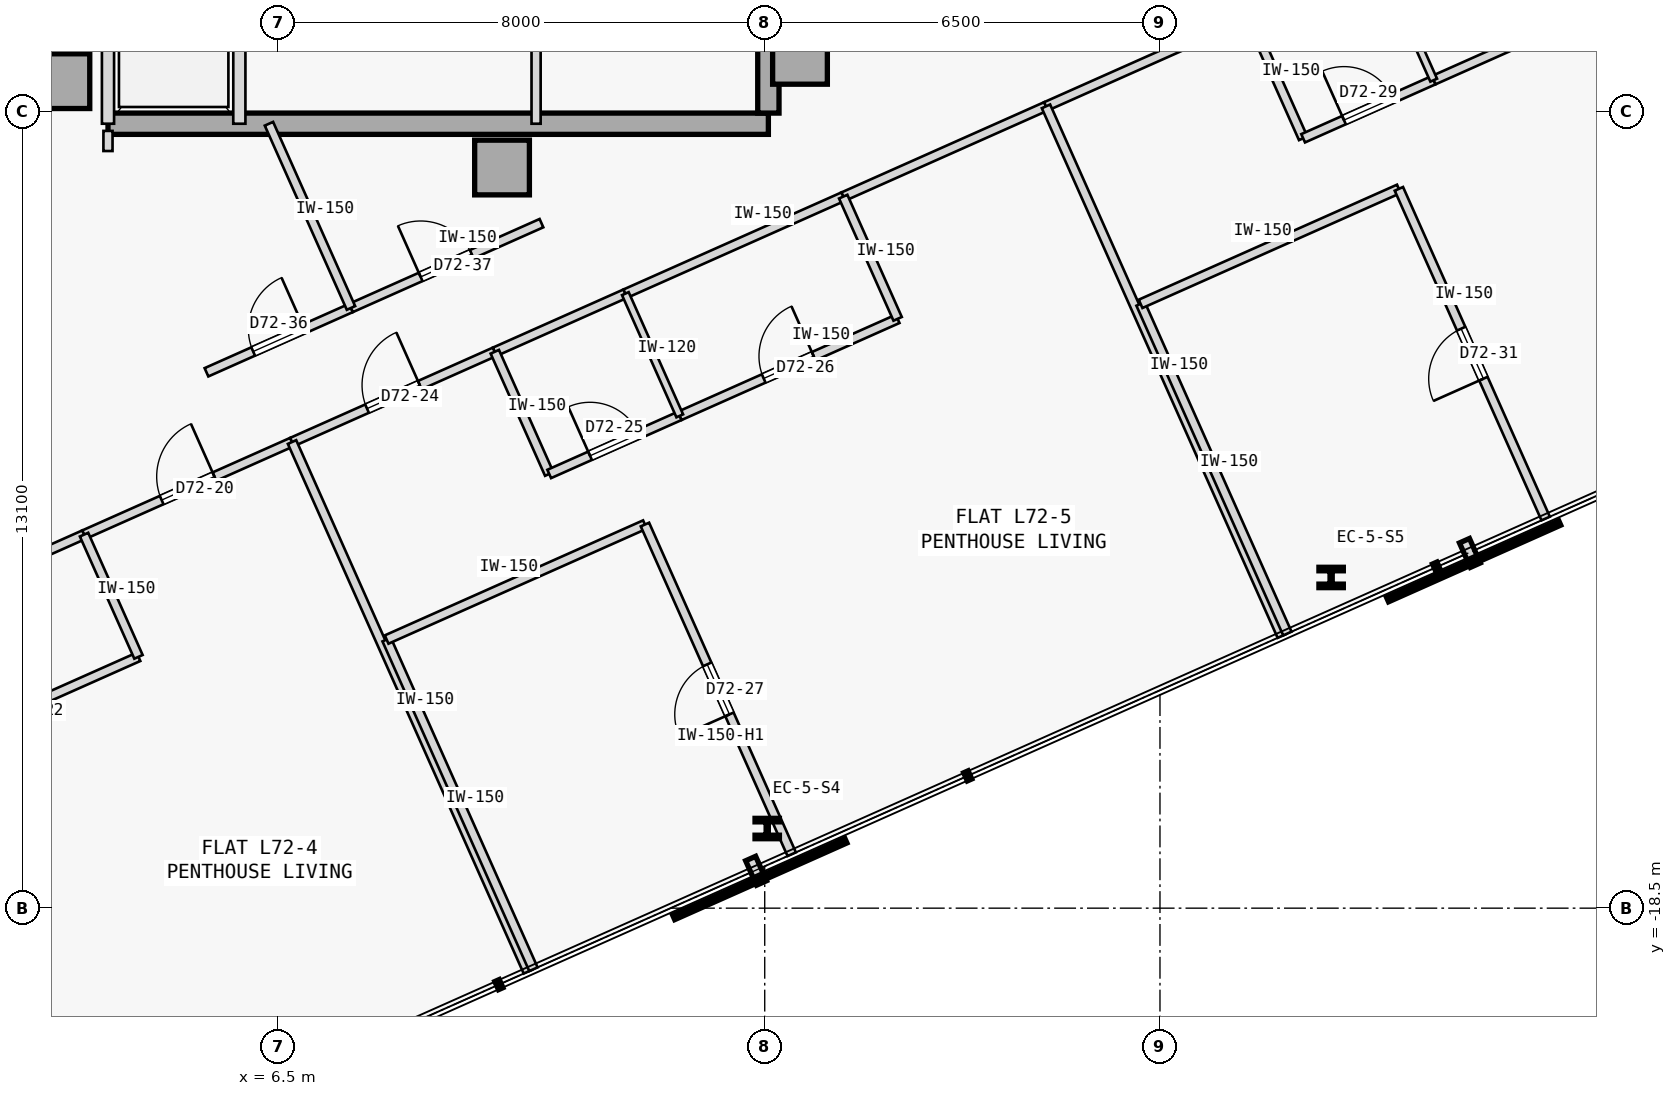
"""IFC4 building model, lengths in metres.
Left out: names, types, materials, properties, quantities, classifications, styles, units other than length and angle.
Written with IfcOpenShell. Run it as: python <this file> out.ifc"""

import sys

from ifc_helpers import new_model, si_unit, direction, frame, frame_2d, origin, origin_2d, place, context, subcontext, project, spatial, rectangle, i_section, extrude, element, fill, save


model = new_model("IFC4")
c1 = context("Model", 3, precision=1e-05, world=origin(), true_north=direction((0.0, 1.0)))
c2 = subcontext(c1, "Body", "Model", "MODEL_VIEW")
j1 = project(units=[si_unit("LENGTHUNIT", "METRE"), si_unit("PLANEANGLEUNIT", "RADIAN")], contexts=[c1])
p1 = place(None, origin())
s1 = spatial("IfcSite", under=j1, at=p1, CompositionType="ELEMENT")
p2 = place(p1, origin())
s2 = spatial("IfcBuilding", under=s1, at=p2, CompositionType="ELEMENT")
p3 = place(p2, frame((0.0, 0.0, 268.9)))
s3 = spatial("IfcBuildingStorey", under=s2, at=p3, CompositionType="ELEMENT", Elevation=268.9)
for number, where, z_axis, x_axis in (
    (1, (15.08, -4.5, 0.0), (0.0, 0.0, 1.0), (1.0, 0.0, 0.0)),
    (2, (10.18, -6.32, 0.0), (0.0, 0.0, 1.0), (1.0, 0.0, 0.0)),
    (3, (2.95, -4.9, 0.0), (0.0, 0.0, 1.0), (1.0, 0.0, 0.0)),
):
    element("IfcColumn", number, at=place(p3, frame(where, z_axis=z_axis, x_axis=x_axis)), inside=s3, PredefinedType="COLUMN", context=c2, shape_type="SweptSolid", body=[
        extrude(rectangle(XDim=0.9, YDim=0.9, at=origin_2d()), origin(), (0.0, 0.0, 1.0), 3.35),
    ])
p4 = place(p3, frame((3.7, -5.6, 0.0), z_axis=(0.0, 0.0, 1.0), x_axis=(1.0, 0.0, 0.0)))
e4 = element("IfcWall", 4, at=p4, inside=s3, PredefinedType="SHEAR", context=c2, shape_type="SweptSolid", body=[
    extrude(rectangle(XDim=10.86, YDim=0.35, at=frame_2d((5.43, 0.0))), origin(), (0.0, 0.0, 1.0), 3.125),
])
p5 = place(p3, frame((14.56, -5.425, 0.0), z_axis=(0.0, 0.0, 1.0), x_axis=(0.0, 1.0, 0.0)))
e5 = element("IfcWall", 5, at=p5, inside=s3, PredefinedType="SHEAR", context=c2, shape_type="SweptSolid", body=[
    extrude(rectangle(XDim=10.85, YDim=0.35, at=frame_2d((5.425, 0.0))), origin(), (0.0, 0.0, 1.0), 3.125),
])
for number, where, z_axis, x_axis in (
    (6, (14.541, -17.19, 0.0), (0.0, 0.0, 1.0), (1.0, 0.0, 0.0)),
    (7, (23.814, -13.062, 0.0), (0.0, 0.0, 1.0), (1.0, 0.0, 0.0)),
):
    element("IfcColumn", number, at=place(p3, frame(where, z_axis=z_axis, x_axis=x_axis)), inside=s3, PredefinedType="COLUMN", context=c2, shape_type="SweptSolid", body=[
        extrude(i_section(OverallWidth=0.401, OverallDepth=0.335, WebThickness=0.036, FlangeThickness=0.058, FilletRadius=0.015, at=origin_2d()), origin(), (0.0, 0.0, 1.0), 3.35),
    ])
for number, where, z_axis, x_axis in (
    (8, (3.7, -5.6, 0.0), (0.0, 0.0, 1.0), (0.0, 1.0, 0.0)),
    (9, (5.86, -5.6, 0.0), (0.0, 0.0, 1.0), (0.0, 1.0, 0.0)),
):
    element("IfcWall", number, at=place(p3, frame(where, z_axis=z_axis, x_axis=x_axis)), inside=s3, PredefinedType="STANDARD", context=c2, shape_type="SweptSolid", body=[
        extrude(rectangle(XDim=2.65, YDim=0.2, at=frame_2d((1.325, 0.0))), origin(), (0.0, 0.0, 1.0), 3.125),
    ])
p6 = place(p3, frame((10.74, -5.6, 0.0), z_axis=(0.0, 0.0, 1.0), x_axis=(0.0, 1.0, 0.0)))
e10 = element("IfcWall", 10, at=p6, inside=s3, PredefinedType="PARTITIONING", context=c2, shape_type="SweptSolid", body=[
    extrude(rectangle(XDim=2.65, YDim=0.15, at=frame_2d((1.325, 0.0))), origin(), (0.0, 0.0, 1.0), 3.125),
])
p7 = place(p3, frame((3.306, -12.357, 0.0), z_axis=(0.0, 0.0, 1.0), x_axis=(0.913550513402, 0.406725287464, 0.0)))
e11 = element("IfcWall", 11, at=p7, inside=s3, PredefinedType="PARTITIONING", context=c2, shape_type="SweptSolid", body=[
    extrude(rectangle(XDim=3.744, YDim=0.15, at=frame_2d((1.872, 0.0))), origin(), (0.0, 0.0, 1.0), 3.125),
])
p8 = place(p7, frame((1.397, 0.0, 0.0)))
e12 = element("IfcOpeningElement", 12, at=p8, cuts=e11, PredefinedType="OPENING", context=c2, shape_type="SweptSolid", body=[
    extrude(rectangle(XDim=0.95, YDim=2.15, at=frame_2d((0.475, 1.075))), frame((0.0, 0.085, 0.0), z_axis=(0.0, -1.0, 0.0), x_axis=(1.0, 0.0, 0.0)), (0.0, 0.0, 1.0), 0.17),
])
p9 = place(p3, frame((-0.667, -14.126, 0.0), z_axis=(0.0, 0.0, 1.0), x_axis=(0.913545193015, 0.406737237438, 0.0)))
e13 = element("IfcWall", 13, at=p9, inside=s3, PredefinedType="PARTITIONING", context=c2, shape_type="SweptSolid", body=[
    extrude(rectangle(XDim=4.35, YDim=0.15, at=frame_2d((2.175, 0.0))), origin(), (0.0, 0.0, 1.0), 3.125),
])
p10 = place(p3, frame((6.727, -10.834, 0.0), z_axis=(0.0, 0.0, 1.0), x_axis=(0.913543802, 0.40674036169, 0.0)))
e14 = element("IfcWall", 14, at=p10, inside=s3, PredefinedType="PARTITIONING", context=c2, shape_type="SweptSolid", body=[
    extrude(rectangle(XDim=3.65, YDim=0.15, at=frame_2d((1.825, 0.0))), origin(), (0.0, 0.0, 1.0), 3.125),
])
p11 = place(p10, frame((1.35, 0.0, 0.0)))
e15 = element("IfcOpeningElement", 15, at=p11, cuts=e14, PredefinedType="OPENING", context=c2, shape_type="SweptSolid", body=[
    extrude(rectangle(XDim=0.95, YDim=2.15, at=frame_2d((0.475, 1.075))), frame((0.0, 0.085, 0.0), z_axis=(0.0, -1.0, 0.0), x_axis=(1.0, 0.0, 0.0)), (0.0, 0.0, 1.0), 0.17),
])
p12 = place(p3, frame((15.791, -6.799, 0.0), z_axis=(0.0, 0.0, 1.0), x_axis=(0.913543802, 0.40674036169, 0.0)))
e16 = element("IfcWall", 16, at=p12, inside=s3, PredefinedType="PARTITIONING", context=c2, shape_type="SweptSolid", body=[
    extrude(rectangle(XDim=3.65, YDim=0.15, at=frame_2d((1.825, 0.0))), origin(), (0.0, 0.0, 1.0), 3.125),
])
p13 = place(p3, frame((10.061, -9.35, 0.0), z_axis=(0.0, 0.0, 1.0), x_axis=(0.913558622212, 0.406707073682, 0.0)))
e17 = element("IfcWall", 17, at=p13, inside=s3, PredefinedType="PARTITIONING", context=c2, shape_type="SweptSolid", body=[
    extrude(rectangle(XDim=2.35, YDim=0.15, at=frame_2d((1.175, 0.0))), origin(), (0.0, 0.0, 1.0), 3.125),
])
p14 = place(p3, frame((12.208, -8.394, 0.0), z_axis=(0.0, 0.0, 1.0), x_axis=(0.913539234326, 0.406750620585, 0.0)))
e18 = element("IfcWall", 18, at=p14, inside=s3, PredefinedType="PARTITIONING", context=c2, shape_type="SweptSolid", body=[
    extrude(rectangle(XDim=3.922, YDim=0.15, at=frame_2d((1.961, 0.0))), origin(), (0.0, 0.0, 1.0), 3.125),
])
p15 = place(p3, frame((19.125, -5.314, 0.0), z_axis=(0.0, 0.0, 1.0), x_axis=(0.913543802, 0.40674036169, 0.0)))
e19 = element("IfcWall", 19, at=p15, inside=s3, PredefinedType="PARTITIONING", context=c2, shape_type="SweptSolid", body=[
    extrude(rectangle(XDim=3.65, YDim=0.15, at=frame_2d((1.825, 0.0))), origin(), (0.0, 0.0, 1.0), 3.125),
])
p16 = place(p3, frame((5.32, -9.688, 0.0), z_axis=(0.0, 0.0, 1.0), x_axis=(0.913559784164, 0.406704463658, 0.0)))
e20 = element("IfcWall", 20, at=p16, inside=s3, PredefinedType="PARTITIONING", context=c2, shape_type="SweptSolid", body=[
    extrude(rectangle(XDim=2.601, YDim=0.15, at=frame_2d((1.301, 0.0))), origin(), (0.0, 0.0, 1.0), 3.125),
])
p17 = place(p16, frame((0.841, 0.0, 0.0)))
e21 = element("IfcOpeningElement", 21, at=p17, cuts=e20, PredefinedType="OPENING", context=c2, shape_type="SweptSolid", body=[
    extrude(rectangle(XDim=0.92, YDim=2.15, at=frame_2d((0.46, 1.075))), frame((0.0, 0.085, 0.0), z_axis=(0.0, -1.0, 0.0), x_axis=(1.0, 0.0, 0.0)), (0.0, 0.0, 1.0), 0.17),
])
p18 = place(p3, frame((3.699, -6.049, 0.0), z_axis=(0.0, 0.0, 1.0), x_axis=(0.001476013152, 0.999998910692, 0.0)))
e22 = element("IfcWall", 22, at=p18, inside=s3, PredefinedType="PARTITIONING", context=c2, shape_type="SweptSolid", body=[
    extrude(rectangle(XDim=0.331, YDim=0.15, at=frame_2d((0.166, 0.0))), origin(), (0.0, 0.0, 1.0), 3.125),
])
p19 = place(p3, frame((7.696, -8.63, 0.0), z_axis=(0.0, 0.0, 1.0), x_axis=(0.913526514415, 0.406779187596, 0.0)))
e23 = element("IfcWall", 23, at=p19, inside=s3, PredefinedType="PARTITIONING", context=c2, shape_type="SweptSolid", body=[
    extrude(rectangle(XDim=3.429, YDim=0.15, at=frame_2d((1.714, 0.0))), origin(), (0.0, 0.0, 1.0), 3.125),
])
p20 = place(p19, frame((1.254, 0.0, 0.0)))
e24 = element("IfcOpeningElement", 24, at=p20, cuts=e23, PredefinedType="OPENING", context=c2, shape_type="SweptSolid", body=[
    extrude(rectangle(XDim=0.92, YDim=2.15, at=frame_2d((0.46, 1.075))), frame((0.0, 0.085, 0.0), z_axis=(0.0, -1.0, 0.0), x_axis=(1.0, 0.0, 0.0)), (0.0, 0.0, 1.0), 0.17),
])
p21 = place(p3, frame((0.227, -16.136, 0.0), z_axis=(0.0, 0.0, 1.0), x_axis=(0.913545193015, 0.406737237438, 0.0)))
e25 = element("IfcWall", 25, at=p21, inside=s3, PredefinedType="PARTITIONING", context=c2, shape_type="SweptSolid", body=[
    extrude(rectangle(XDim=4.35, YDim=0.15, at=frame_2d((2.175, 0.0))), origin(), (0.0, 0.0, 1.0), 3.125),
])
p22 = place(p21, frame((1.725, 0.0, 0.0)))
e26 = element("IfcOpeningElement", 26, at=p22, cuts=e25, PredefinedType="OPENING", context=c2, shape_type="SweptSolid", body=[
    extrude(rectangle(XDim=0.9, YDim=2.15, at=frame_2d((0.45, 1.075))), frame((0.0, 0.085, 0.0), z_axis=(0.0, -1.0, 0.0), x_axis=(1.0, 0.0, 0.0)), (0.0, 0.0, 1.0), 0.17),
])
p23 = place(p3, frame((4.201, -14.367, 0.0), z_axis=(0.0, 0.0, 1.0), x_axis=(-0.406725294076, 0.913550510459, 0.0)))
e27 = element("IfcWall", 27, at=p23, inside=s3, PredefinedType="PARTITIONING", context=c2, shape_type="SweptSolid", body=[
    extrude(rectangle(XDim=2.2, YDim=0.15, at=frame_2d((1.1, 0.0))), origin(), (0.0, 0.0, 1.0), 3.125),
])
p24 = place(p3, frame((10.605, -19.545, 0.0), z_axis=(0.0, 0.0, 1.0), x_axis=(-0.406760810574, 0.913534697196, 0.0)))
e28 = element("IfcWall", 28, at=p24, inside=s3, PredefinedType="PARTITIONING", context=c2, shape_type="SweptSolid", body=[
    extrude(rectangle(XDim=9.535, YDim=0.15, at=frame_2d((4.768, 0.0))), origin(), (0.0, 0.0, 1.0), 3.125),
])
p25 = place(p3, frame((10.956, -11.36, 0.0), z_axis=(0.0, 0.0, 1.0), x_axis=(-0.406725294076, 0.913550510459, 0.0)))
e29 = element("IfcWall", 29, at=p25, inside=s3, PredefinedType="PARTITIONING", context=c2, shape_type="SweptSolid", body=[
    extrude(rectangle(XDim=2.2, YDim=0.15, at=frame_2d((1.1, 0.0))), origin(), (0.0, 0.0, 1.0), 3.125),
])
p26 = place(p3, frame((10.956, -11.36, 0.0), z_axis=(0.0, 0.0, 1.0), x_axis=(0.913558622212, 0.406707073682, 0.0)))
e30 = element("IfcWall", 30, at=p26, inside=s3, PredefinedType="PARTITIONING", context=c2, shape_type="SweptSolid", body=[
    extrude(rectangle(XDim=2.35, YDim=0.15, at=frame_2d((1.175, 0.0))), origin(), (0.0, 0.0, 1.0), 3.125),
])
p27 = place(p26, frame((0.735, 0.0, 0.0)))
e31 = element("IfcOpeningElement", 31, at=p27, cuts=e30, PredefinedType="OPENING", context=c2, shape_type="SweptSolid", body=[
    extrude(rectangle(XDim=0.88, YDim=2.15, at=frame_2d((0.44, 1.075))), frame((0.0, 0.085, 0.0), z_axis=(0.0, -1.0, 0.0), x_axis=(1.0, 0.0, 0.0)), (0.0, 0.0, 1.0), 0.17),
])
p28 = place(p3, frame((13.103, -10.404, 0.0), z_axis=(0.0, 0.0, 1.0), x_axis=(0.913549532696, 0.406727490232, 0.0)))
e32 = element("IfcWall", 32, at=p28, inside=s3, PredefinedType="PARTITIONING", context=c2, shape_type="SweptSolid", body=[
    extrude(rectangle(XDim=3.922, YDim=0.15, at=frame_2d((1.961, 0.0))), origin(), (0.0, 0.0, 1.0), 3.125),
])
p29 = place(p28, frame((1.511, 0.0, 0.0)))
e33 = element("IfcOpeningElement", 33, at=p29, cuts=e32, PredefinedType="OPENING", context=c2, shape_type="SweptSolid", body=[
    extrude(rectangle(XDim=0.9, YDim=2.15, at=frame_2d((0.45, 1.075))), frame((0.0, 0.085, 0.0), z_axis=(0.0, -1.0, 0.0), x_axis=(1.0, 0.0, 0.0)), (0.0, 0.0, 1.0), 0.17),
])
p30 = place(p3, frame((16.686, -8.809, 0.0), z_axis=(0.0, 0.0, 1.0), x_axis=(-0.406817905151, 0.913509273105, 0.0)))
e34 = element("IfcWall", 34, at=p30, inside=s3, PredefinedType="PARTITIONING", context=c2, shape_type="SweptSolid", body=[
    extrude(rectangle(XDim=2.2, YDim=0.15, at=frame_2d((1.1, 0.0))), origin(), (0.0, 0.0, 1.0), 3.125),
])
p31 = place(p3, frame((10.696, -19.504, 0.0), z_axis=(0.0, 0.0, 1.0), x_axis=(-0.406749048544, 0.913539934271, 0.0)))
e35 = element("IfcWall", 35, at=p31, inside=s3, PredefinedType="PARTITIONING", context=c2, shape_type="SweptSolid", body=[
    extrude(rectangle(XDim=5.935, YDim=0.15, at=frame_2d((2.968, 0.0))), origin(), (0.0, 0.0, 1.0), 3.125),
])
p32 = place(p3, frame((8.282, -14.083, 0.0), z_axis=(0.0, 0.0, 1.0), x_axis=(0.91354505039, 0.40673755778, 0.0)))
e36 = element("IfcWall", 36, at=p32, inside=s3, PredefinedType="PARTITIONING", context=c2, shape_type="SweptSolid", body=[
    extrude(rectangle(XDim=4.65, YDim=0.15, at=frame_2d((2.325, 0.0))), origin(), (0.0, 0.0, 1.0), 3.125),
])
p33 = place(p3, frame((14.944, -17.613, 0.0), z_axis=(0.0, 0.0, 1.0), x_axis=(-0.406714717734, 0.913555219119, 0.0)))
e37 = element("IfcWall", 37, at=p33, inside=s3, PredefinedType="PARTITIONING", context=c2, shape_type="SweptSolid", body=[
    extrude(rectangle(XDim=5.935, YDim=0.15, at=frame_2d((2.967, 0.0))), origin(), (0.0, 0.0, 1.0), 2.675),
])
p34 = place(p33, frame((2.518, 0.0, 0.0)))
e38 = element("IfcOpeningElement", 38, at=p34, cuts=e37, PredefinedType="OPENING", context=c2, shape_type="SweptSolid", body=[
    extrude(rectangle(XDim=0.9, YDim=2.15, at=frame_2d((0.45, 1.075))), frame((0.0, 0.085, 0.0), z_axis=(0.0, -1.0, 0.0), x_axis=(1.0, 0.0, 0.0)), (0.0, 0.0, 1.0), 0.17),
])
p35 = place(p3, frame((23.003, -14.025, 0.0), z_axis=(0.0, 0.0, 1.0), x_axis=(-0.406729927653, 0.913548447512, 0.0)))
e39 = element("IfcWall", 39, at=p35, inside=s3, PredefinedType="PARTITIONING", context=c2, shape_type="SweptSolid", body=[
    extrude(rectangle(XDim=9.535, YDim=0.15, at=frame_2d((4.768, 0.0))), origin(), (0.0, 0.0, 1.0), 3.125),
])
p36 = place(p3, frame((13.103, -10.404, 0.0), z_axis=(0.0, 0.0, 1.0), x_axis=(-0.406725294076, 0.913550510459, 0.0)))
e40 = element("IfcWall", 40, at=p36, inside=s3, PredefinedType="PARTITIONING", context=c2, shape_type="SweptSolid", body=[
    extrude(rectangle(XDim=2.2, YDim=0.12, at=frame_2d((1.1, 0.0))), origin(), (0.0, 0.0, 1.0), 3.125),
])
p37 = place(p3, frame((23.354, -5.839, 0.0), z_axis=(0.0, 0.0, 1.0), x_axis=(-0.406725294076, 0.913550510459, 0.0)))
e41 = element("IfcWall", 41, at=p37, inside=s3, PredefinedType="PARTITIONING", context=c2, shape_type="SweptSolid", body=[
    extrude(rectangle(XDim=2.2, YDim=0.15, at=frame_2d((1.1, 0.0))), origin(), (0.0, 0.0, 1.0), 3.125),
])
p38 = place(p3, frame((23.354, -5.839, 0.0), z_axis=(0.0, 0.0, 1.0), x_axis=(0.913558622212, 0.406707073682, 0.0)))
e42 = element("IfcWall", 42, at=p38, inside=s3, PredefinedType="PARTITIONING", context=c2, shape_type="SweptSolid", body=[
    extrude(rectangle(XDim=2.35, YDim=0.15, at=frame_2d((1.175, 0.0))), origin(), (0.0, 0.0, 1.0), 3.125),
])
p39 = place(p38, frame((0.735, 0.0, 0.0)))
e43 = element("IfcOpeningElement", 43, at=p39, cuts=e42, PredefinedType="OPENING", context=c2, shape_type="SweptSolid", body=[
    extrude(rectangle(XDim=0.88, YDim=2.15, at=frame_2d((0.44, 1.075))), frame((0.0, 0.085, 0.0), z_axis=(0.0, -1.0, 0.0), x_axis=(1.0, 0.0, 0.0)), (0.0, 0.0, 1.0), 0.17),
])
p40 = place(p3, frame((25.501, -4.884, 0.0), z_axis=(0.0, 0.0, 1.0), x_axis=(0.913545193015, 0.406737237438, 0.0)))
e44 = element("IfcWall", 44, at=p40, inside=s3, PredefinedType="PARTITIONING", context=c2, shape_type="SweptSolid", body=[
    extrude(rectangle(XDim=4.35, YDim=0.15, at=frame_2d((2.175, 0.0))), origin(), (0.0, 0.0, 1.0), 3.125),
])
p41 = place(p40, frame((1.725, 0.0, 0.0)))
e45 = element("IfcOpeningElement", 45, at=p41, cuts=e44, PredefinedType="OPENING", context=c2, shape_type="SweptSolid", body=[
    extrude(rectangle(XDim=0.9, YDim=2.15, at=frame_2d((0.45, 1.075))), frame((0.0, 0.085, 0.0), z_axis=(0.0, -1.0, 0.0), x_axis=(1.0, 0.0, 0.0)), (0.0, 0.0, 1.0), 0.17),
])
p42 = place(p3, frame((23.095, -13.984, 0.0), z_axis=(0.0, 0.0, 1.0), x_axis=(-0.406749048544, 0.913539934271, 0.0)))
e46 = element("IfcWall", 46, at=p42, inside=s3, PredefinedType="PARTITIONING", context=c2, shape_type="SweptSolid", body=[
    extrude(rectangle(XDim=5.935, YDim=0.15, at=frame_2d((2.968, 0.0))), origin(), (0.0, 0.0, 1.0), 3.125),
])
p43 = place(p3, frame((20.681, -8.562, 0.0), z_axis=(0.0, 0.0, 1.0), x_axis=(0.91354505039, 0.40673755778, 0.0)))
e47 = element("IfcWall", 47, at=p43, inside=s3, PredefinedType="PARTITIONING", context=c2, shape_type="SweptSolid", body=[
    extrude(rectangle(XDim=4.65, YDim=0.15, at=frame_2d((2.325, 0.0))), origin(), (0.0, 0.0, 1.0), 3.125),
])
p44 = place(p3, frame((27.343, -12.093, 0.0), z_axis=(0.0, 0.0, 1.0), x_axis=(-0.406714717734, 0.913555219119, 0.0)))
e48 = element("IfcWall", 48, at=p44, inside=s3, PredefinedType="PARTITIONING", context=c2, shape_type="SweptSolid", body=[
    extrude(rectangle(XDim=5.935, YDim=0.15, at=frame_2d((2.967, 0.0))), origin(), (0.0, 0.0, 1.0), 3.125),
])
p45 = place(p44, frame((2.518, 0.0, 0.0)))
e49 = element("IfcOpeningElement", 49, at=p45, cuts=e48, PredefinedType="OPENING", context=c2, shape_type="SweptSolid", body=[
    extrude(rectangle(XDim=0.9, YDim=2.15, at=frame_2d((0.45, 1.075))), frame((0.0, 0.085, 0.0), z_axis=(0.0, -1.0, 0.0), x_axis=(1.0, 0.0, 0.0)), (0.0, 0.0, 1.0), 0.17),
])
p46 = place(p3, frame((25.501, -4.884, 0.0), z_axis=(0.0, 0.0, 1.0), x_axis=(-0.406817905151, 0.913509273105, 0.0)))
e50 = element("IfcWall", 50, at=p46, inside=s3, PredefinedType="PARTITIONING", context=c2, shape_type="SweptSolid", body=[
    extrude(rectangle(XDim=2.2, YDim=0.12, at=frame_2d((1.1, 0.0))), origin(), (0.0, 0.0, 1.0), 3.125),
])
p47 = place(p3, frame((7.696, -8.63, 0.0), z_axis=(0.0, 0.0, 1.0), x_axis=(-0.406773661192, 0.913528975217, 0.0)))
e51 = element("IfcWall", 51, at=p47, inside=s3, PredefinedType="PARTITIONING", context=c2, shape_type="SweptSolid", body=[
    extrude(rectangle(XDim=3.316, YDim=0.15, at=frame_2d((1.658, 0.0))), origin(), (0.0, 0.0, 1.0), 3.125),
])
p48 = place(p8, origin())
e52 = element("IfcDoor", 52, at=p48, inside=s3, OperationType="SINGLE_SWING_RIGHT", PredefinedType="DOOR", context=c2, shape_type="SweptSolid", body=[
    extrude(rectangle(XDim=0.95, YDim=2.15, at=frame_2d((0.475, 1.075))), frame((0.0, 0.025, 0.0), z_axis=(0.0, -1.0, 0.0), x_axis=(1.0, 0.0, 0.0)), (0.0, 0.0, 1.0), 0.05),
])
fill(e12, e52)
p49 = place(p11, origin())
e53 = element("IfcDoor", 53, at=p49, inside=s3, OperationType="SINGLE_SWING_RIGHT", PredefinedType="DOOR", context=c2, shape_type="SweptSolid", body=[
    extrude(rectangle(XDim=0.95, YDim=2.15, at=frame_2d((0.475, 1.075))), frame((0.0, 0.025, 0.0), z_axis=(0.0, -1.0, 0.0), x_axis=(1.0, 0.0, 0.0)), (0.0, 0.0, 1.0), 0.05),
])
fill(e15, e53)
p50 = place(p27, origin())
e54 = element("IfcDoor", 54, at=p50, inside=s3, OperationType="SINGLE_SWING_LEFT", PredefinedType="DOOR", context=c2, shape_type="SweptSolid", body=[
    extrude(rectangle(XDim=0.88, YDim=2.15, at=frame_2d((0.44, 1.075))), frame((0.0, 0.025, 0.0), z_axis=(0.0, -1.0, 0.0), x_axis=(1.0, 0.0, 0.0)), (0.0, 0.0, 1.0), 0.05),
])
fill(e31, e54)
p51 = place(p29, origin())
e55 = element("IfcDoor", 55, at=p51, inside=s3, OperationType="SINGLE_SWING_RIGHT", PredefinedType="DOOR", context=c2, shape_type="SweptSolid", body=[
    extrude(rectangle(XDim=0.9, YDim=2.15, at=frame_2d((0.45, 1.075))), frame((0.0, 0.025, 0.0), z_axis=(0.0, -1.0, 0.0), x_axis=(1.0, 0.0, 0.0)), (0.0, 0.0, 1.0), 0.05),
])
fill(e33, e55)
p52 = place(p34, origin())
e56 = element("IfcDoor", 56, at=p52, inside=s3, OperationType="SINGLE_SWING_LEFT", PredefinedType="DOOR", context=c2, shape_type="SweptSolid", body=[
    extrude(rectangle(XDim=0.9, YDim=2.15, at=frame_2d((0.45, 1.075))), frame((0.0, 0.025, 0.0), z_axis=(0.0, -1.0, 0.0), x_axis=(1.0, 0.0, 0.0)), (0.0, 0.0, 1.0), 0.05),
])
fill(e38, e56)
p53 = place(p39, origin())
e57 = element("IfcDoor", 57, at=p53, inside=s3, OperationType="SINGLE_SWING_LEFT", PredefinedType="DOOR", context=c2, shape_type="SweptSolid", body=[
    extrude(rectangle(XDim=0.88, YDim=2.15, at=frame_2d((0.44, 1.075))), frame((0.0, 0.025, 0.0), z_axis=(0.0, -1.0, 0.0), x_axis=(1.0, 0.0, 0.0)), (0.0, 0.0, 1.0), 0.05),
])
fill(e43, e57)
p54 = place(p45, origin())
e58 = element("IfcDoor", 58, at=p54, inside=s3, OperationType="SINGLE_SWING_LEFT", PredefinedType="DOOR", context=c2, shape_type="SweptSolid", body=[
    extrude(rectangle(XDim=0.9, YDim=2.15, at=frame_2d((0.45, 1.075))), frame((0.0, 0.025, 0.0), z_axis=(0.0, -1.0, 0.0), x_axis=(1.0, 0.0, 0.0)), (0.0, 0.0, 1.0), 0.05),
])
fill(e49, e58)
p55 = place(p17, origin())
e59 = element("IfcDoor", 59, at=p55, inside=s3, OperationType="SINGLE_SWING_RIGHT", PredefinedType="DOOR", context=c2, shape_type="SweptSolid", body=[
    extrude(rectangle(XDim=0.92, YDim=2.15, at=frame_2d((0.46, 1.075))), frame((0.0, 0.025, 0.0), z_axis=(0.0, -1.0, 0.0), x_axis=(1.0, 0.0, 0.0)), (0.0, 0.0, 1.0), 0.05),
])
fill(e21, e59)
p56 = place(p20, origin())
e60 = element("IfcDoor", 60, at=p56, inside=s3, OperationType="SINGLE_SWING_LEFT", PredefinedType="DOOR", context=c2, shape_type="SweptSolid", body=[
    extrude(rectangle(XDim=0.92, YDim=2.15, at=frame_2d((0.46, 1.075))), frame((0.0, 0.025, 0.0), z_axis=(0.0, -1.0, 0.0), x_axis=(1.0, 0.0, 0.0)), (0.0, 0.0, 1.0), 0.05),
])
fill(e24, e60)
save(model, sys.argv[1])
